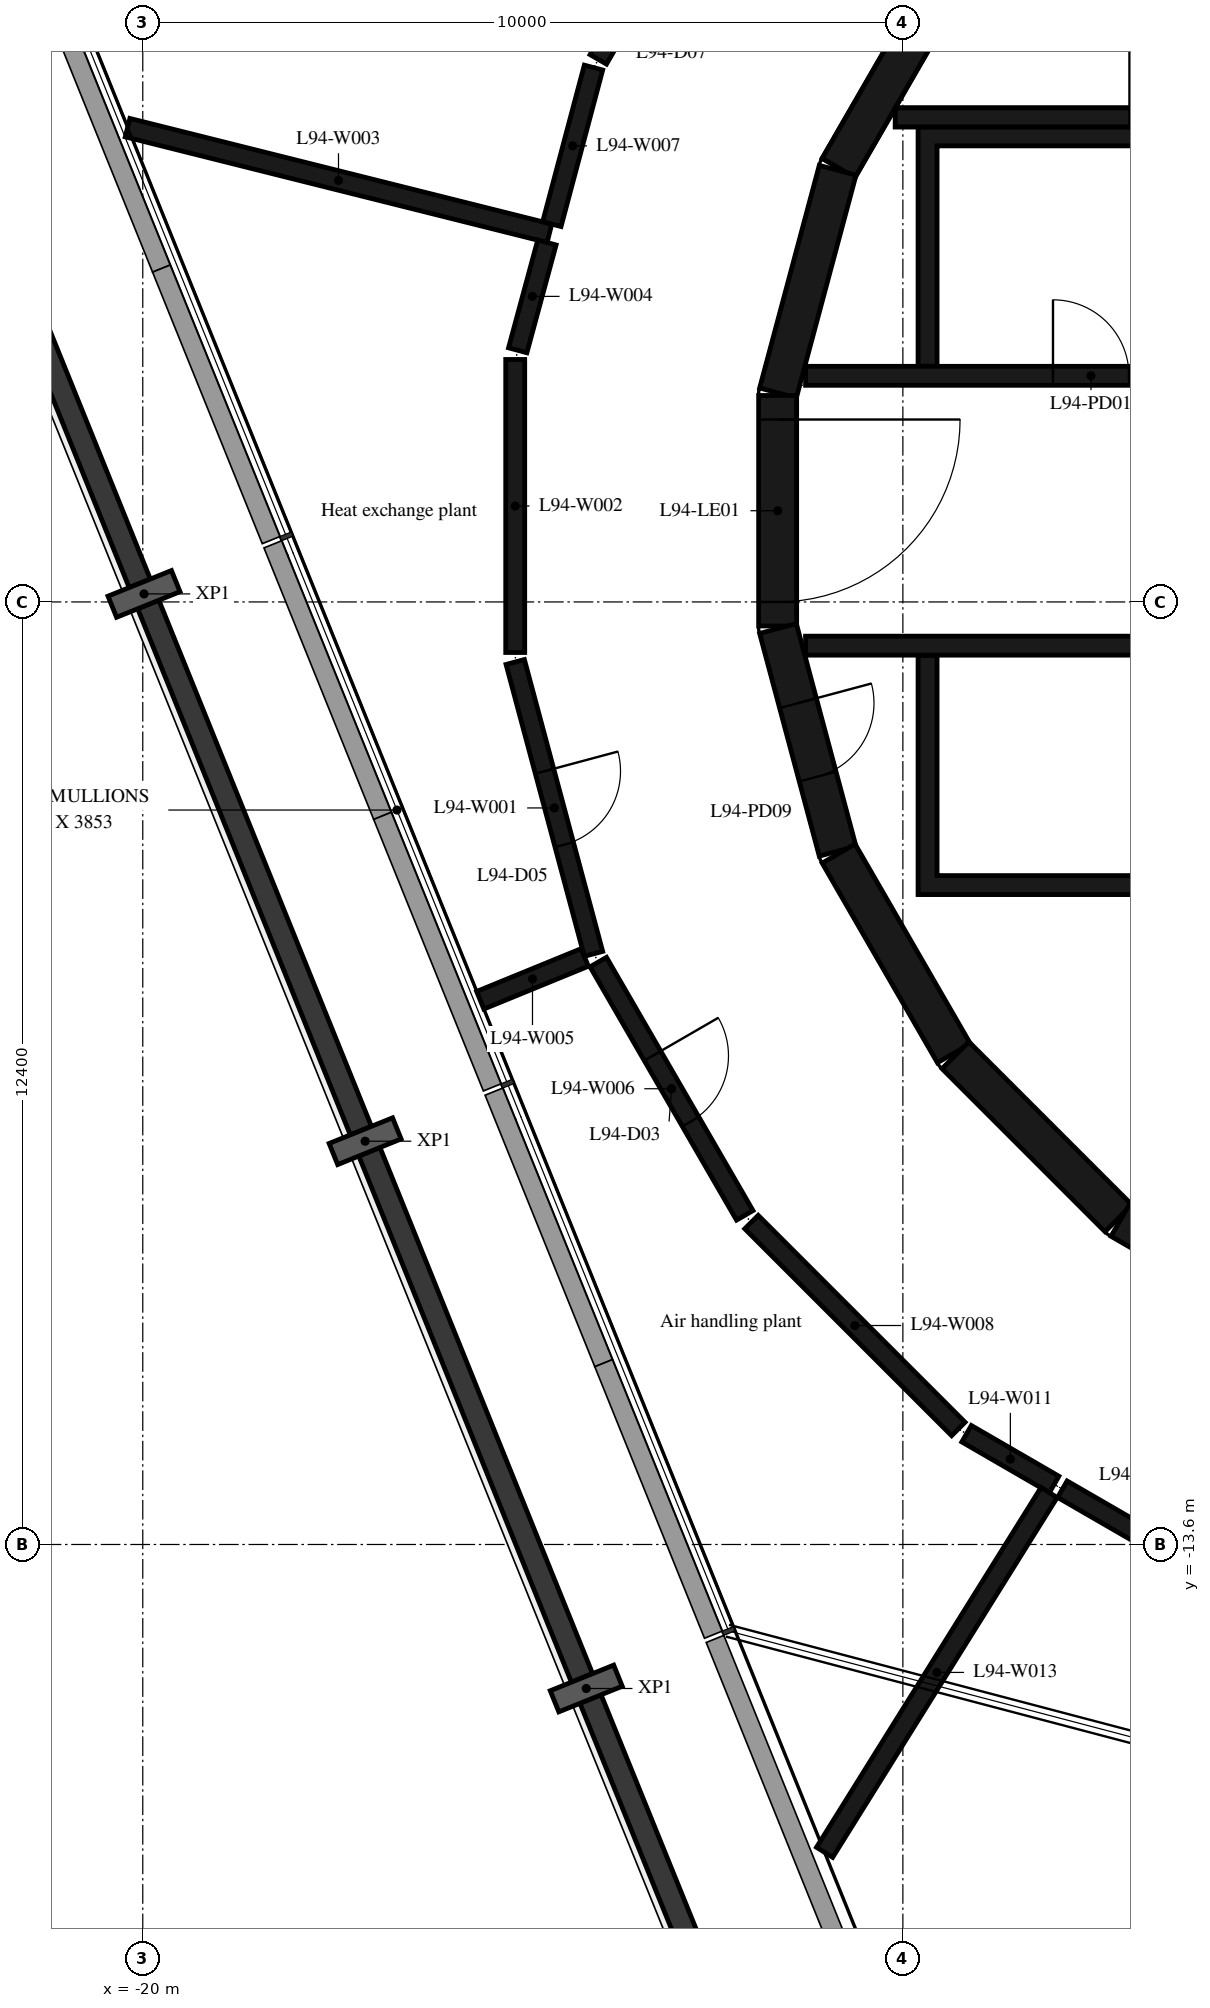
"""IFC4 building model, lengths in metres.
Left out: names, types, materials, properties, quantities, classifications, styles, units other than length and angle.
Written with IfcOpenShell. Run it as: python <this file> out.ifc"""

import sys

from ifc_helpers import new_model, si_unit, direction, frame, frame_2d, origin, origin_2d, place, context, subcontext, project, spatial, polyline, rectangle, i_section, outline, extrude, element, fill, save


model = new_model("IFC4")
c1 = context("Model", 3, precision=1e-05, world=origin(), true_north=direction((0.0, 1.0)))
c2 = subcontext(c1, "Body", "Model", "MODEL_VIEW")
j1 = project(units=[si_unit("LENGTHUNIT", "METRE"), si_unit("PLANEANGLEUNIT", "RADIAN")], contexts=[c1])
p1 = place(None, origin())
s1 = spatial("IfcSite", under=j1, at=p1, CompositionType="ELEMENT")
p2 = place(p1, origin())
s2 = spatial("IfcBuilding", under=s1, at=p2, CompositionType="ELEMENT")
p3 = place(p2, frame((0.0, 0.0, 366.2)))
s3 = spatial("IfcBuildingStorey", under=s2, at=p3, CompositionType="ELEMENT", Elevation=366.2)
for number, where, z_axis, x_axis in (
    (1, (-19.984, -1.094, -0.38), (0.0, 0.0, 1.0), (-0.375, 0.927, 0.0)),
    (2, (-17.075, -8.294, -0.38), (0.0, 0.0, 1.0), (-0.375, 0.927, 0.0)),
    (3, (-14.166, -15.495, -0.38), (0.0, 0.0, 1.0), (-0.375, 0.927, 0.0)),
):
    element("IfcColumn", number, at=place(p3, frame(where, z_axis=z_axis, x_axis=x_axis)), inside=s3, PredefinedType="COLUMN", context=c2, shape_type="SweptSolid", body=[
        extrude(i_section(OverallWidth=0.3, OverallDepth=0.9, WebThickness=0.019, FlangeThickness=0.035, FilletRadius=0.03, at=origin_2d()), origin(), (0.0, 0.0, 1.0), 5.58),
    ])
p4 = place(p3, frame((-22.836, 5.967, 5.2), z_axis=(0.0, 0.0, 1.0), x_axis=(0.374607955373, -0.927183304299, 0.0)))
e4 = element("IfcWall", 4, at=p4, inside=s3, PredefinedType="PARAPET", context=c2, shape_type="SweptSolid", body=[
    extrude(rectangle(XDim=7.466, YDim=0.3, at=frame_2d((3.733, 0.0))), origin(), (0.0, 0.0, 1.0), 0.58),
])
p5 = place(p3, frame((-19.927, -1.233, 5.2), z_axis=(0.0, 0.0, 1.0), x_axis=(0.374596597098, -0.927187893279, 0.0)))
e5 = element("IfcWall", 5, at=p5, inside=s3, PredefinedType="PARAPET", context=c2, shape_type="SweptSolid", body=[
    extrude(rectangle(XDim=7.466, YDim=0.3, at=frame_2d((3.733, 0.0))), origin(), (0.0, 0.0, 1.0), 0.58),
])
p6 = place(p3, frame((-17.018, -8.434, 5.2), z_axis=(0.0, 0.0, 1.0), x_axis=(0.374607955373, -0.927183304299, 0.0)))
e6 = element("IfcWall", 6, at=p6, inside=s3, PredefinedType="PARAPET", context=c2, shape_type="SweptSolid", body=[
    extrude(rectangle(XDim=7.466, YDim=0.3, at=frame_2d((3.733, 0.0))), origin(), (0.0, 0.0, 1.0), 0.58),
])
p7 = place(p3, frame((-14.109, -15.634, 5.2), z_axis=(0.0, 0.0, 1.0), x_axis=(0.375946149404, -0.926641512532, 0.0)))
e7 = element("IfcWall", 7, at=p7, inside=s3, PredefinedType="PARAPET", context=c2, shape_type="SweptSolid", body=[
    extrude(rectangle(XDim=6.536, YDim=0.3, at=frame_2d((3.268, 0.0))), origin(), (0.0, 0.0, 1.0), 0.58),
])
for number, where, z_axis, x_axis in (
    (8, (-9.329, 7.137, 0.0), (0.0, 0.0, 1.0), (-0.5, -0.866, 0.0)),
    (9, (-10.858, 4.479, 0.0), (0.0, 0.0, 1.0), (-0.259, -0.966, 0.0)),
):
    element("IfcWall", number, at=place(p3, frame(where, z_axis=z_axis, x_axis=x_axis)), inside=s3, PredefinedType="SHEAR", context=c2, shape_type="SweptSolid", body=[
        extrude(rectangle(XDim=3.033, YDim=0.5, at=frame_2d((1.516, 0.0))), origin(), (0.0, 0.0, 1.0), 4.8),
    ])
p8 = place(p3, frame((-11.647, 1.516, 0.0), z_axis=(0.0, 0.0, 1.0), x_axis=(0.0, -1.0, 0.0)))
e10 = element("IfcWall", 10, at=p8, inside=s3, PredefinedType="SHEAR", context=c2, shape_type="SweptSolid", body=[
    extrude(rectangle(XDim=3.033, YDim=0.5, at=frame_2d((1.516, 0.0))), origin(), (0.0, 0.0, 1.0), 4.8),
])
p9 = place(p8, frame((0.316, 0.0, 0.0)))
e11 = element("IfcOpeningElement", 11, at=p9, cuts=e10, PredefinedType="OPENING", context=c2, shape_type="SweptSolid", body=[
    extrude(rectangle(XDim=2.4, YDim=2.1, at=frame_2d((1.2, 1.05))), frame((0.0, 0.26, 0.0), z_axis=(0.0, -1.0, 0.0), x_axis=(1.0, 0.0, 0.0)), (0.0, 0.0, 1.0), 0.52),
])
p10 = place(p3, frame((-11.643, -1.55, 0.0), z_axis=(0.0, 0.0, 1.0), x_axis=(0.258734743916, -0.965948410781, 0.0)))
e12 = element("IfcWall", 12, at=p10, inside=s3, PredefinedType="SHEAR", context=c2, shape_type="SweptSolid", body=[
    extrude(rectangle(XDim=3.033, YDim=0.5, at=frame_2d((1.516, 0.0))), origin(), (0.0, 0.0, 1.0), 4.8),
])
p11 = place(p10, frame((1.016, 0.0, 0.0)))
e13 = element("IfcOpeningElement", 13, at=p11, cuts=e12, PredefinedType="OPENING", context=c2, shape_type="SweptSolid", body=[
    extrude(rectangle(XDim=1.0, YDim=2.4, at=frame_2d((0.5, 1.2))), frame((0.0, 0.26, 0.0), z_axis=(0.0, -1.0, 0.0), x_axis=(1.0, 0.0, 0.0)), (0.0, 0.0, 1.0), 0.52),
])
p12 = place(p3, frame((-10.845, -4.51, 0.0), z_axis=(0.0, 0.0, 1.0), x_axis=(0.500087131594, -0.865975092491, 0.0)))
e14 = element("IfcWall", 14, at=p12, inside=s3, PredefinedType="SHEAR", context=c2, shape_type="SweptSolid", body=[
    extrude(rectangle(XDim=3.033, YDim=0.5, at=frame_2d((1.516, 0.0))), origin(), (0.0, 0.0, 1.0), 4.8),
])
p13 = place(p3, frame((-9.308, -7.164, 0.0), z_axis=(0.0, 0.0, 1.0), x_axis=(0.707106781187, -0.707106781187, 0.0)))
e15 = element("IfcWall", 15, at=p13, inside=s3, PredefinedType="SHEAR", context=c2, shape_type="SweptSolid", body=[
    extrude(rectangle(XDim=3.032, YDim=0.5, at=frame_2d((1.516, 0.0))), origin(), (0.0, 0.0, 1.0), 4.8),
])
p14 = place(p3, frame((-7.137, -9.329, 0.0), z_axis=(0.0, 0.0, 1.0), x_axis=(0.865975092491, -0.500087131594, 0.0)))
e16 = element("IfcWall", 16, at=p14, inside=s3, PredefinedType="SHEAR", context=c2, shape_type="SweptSolid", body=[
    extrude(rectangle(XDim=3.033, YDim=0.5, at=frame_2d((1.516, 0.0))), origin(), (0.0, 0.0, 1.0), 4.8),
])
p15 = place(p3, frame((-7.0, 5.175, 0.0), z_axis=(0.0, 0.0, 1.0), x_axis=(-1.0, 0.0, 0.0)))
e17 = element("IfcWall", 17, at=p15, inside=s3, PredefinedType="SHEAR", context=c2, shape_type="SweptSolid", body=[
    extrude(rectangle(XDim=3.1, YDim=0.25, at=frame_2d((1.55, 0.0))), origin(), (0.0, 0.0, 1.0), 4.8),
])
p16 = place(p3, origin())
e18 = element("IfcWall", 18, at=p16, inside=s3, PredefinedType="SHEAR", context=c2, shape_type="SweptSolid", body=[
    extrude(outline(polyline([(-9.8, 1.9), (-9.55, 1.9), (-9.55, 4.8), (-5.5, 4.8), (-5.5, 1.9), (-5.25, 1.9), (-5.25, 4.8), (3.1, 4.8), (3.1, 1.9), (3.35, 1.9), (3.35, 4.8), (5.25, 4.8), (5.25, 1.9), (5.5, 1.9), (5.5, 4.8), (7.4, 4.8), (7.4, 1.9), (7.65, 1.9), (7.65, 4.8), (9.55, 4.8), (9.55, 1.9), (9.8, 1.9), (9.8, 4.8), (9.8, 5.05), (-9.8, 5.05), (-9.8, 4.8), (-9.8, 1.9)])), origin(), (0.0, 0.0, 1.0), 4.8),
])
p17 = place(p3, origin())
e19 = element("IfcWall", 19, at=p17, inside=s3, PredefinedType="SHEAR", context=c2, shape_type="SweptSolid", body=[
    extrude(outline(polyline([(9.8, -4.8), (9.8, -1.9), (9.55, -1.9), (9.55, -4.8), (7.65, -4.8), (7.65, -1.9), (7.4, -1.9), (7.4, -4.8), (5.5, -4.8), (5.5, -1.9), (5.25, -1.9), (5.25, -4.8), (3.35, -4.8), (3.35, -1.9), (3.1, -1.9), (3.1, -4.8), (-9.55, -4.8), (-9.55, -1.9), (-9.8, -1.9), (-9.8, -4.8), (-9.8, -5.05), (9.8, -5.05), (9.8, -4.8)])), origin(), (0.0, 0.0, 1.0), 4.8),
])
p18 = place(p3, frame((-11.28, 1.775, 0.0), z_axis=(0.0, 0.0, 1.0), x_axis=(1.0, 0.0, 0.0)))
e20 = element("IfcWall", 20, at=p18, inside=s3, PredefinedType="SHEAR", context=c2, shape_type="SweptSolid", body=[
    extrude(rectangle(XDim=14.38, YDim=0.25, at=frame_2d((7.19, 0.0))), origin(), (0.0, 0.0, 1.0), 4.8),
])
p19 = place(p18, frame((3.255, 0.0, 0.0)))
e21 = element("IfcOpeningElement", 21, at=p19, cuts=e20, PredefinedType="OPENING", context=c2, shape_type="SweptSolid", body=[
    extrude(rectangle(XDim=1.0, YDim=2.4, at=frame_2d((0.5, 1.2))), frame((0.0, 0.135, 0.0), z_axis=(0.0, -1.0, 0.0), x_axis=(1.0, 0.0, 0.0)), (0.0, 0.0, 1.0), 0.27),
])
p20 = place(p18, frame((9.705, 0.0, 0.0)))
e22 = element("IfcOpeningElement", 22, at=p20, cuts=e20, PredefinedType="OPENING", context=c2, shape_type="SweptSolid", body=[
    extrude(rectangle(XDim=1.0, YDim=2.4, at=frame_2d((0.5, 1.2))), frame((0.0, 0.135, 0.0), z_axis=(0.0, -1.0, 0.0), x_axis=(1.0, 0.0, 0.0)), (0.0, 0.0, 1.0), 0.27),
])
p21 = place(p3, frame((-11.28, -1.775, 0.0), z_axis=(0.0, 0.0, 1.0), x_axis=(1.0, 0.0, 0.0)))
e23 = element("IfcWall", 23, at=p21, inside=s3, PredefinedType="SHEAR", context=c2, shape_type="SweptSolid", body=[
    extrude(rectangle(XDim=14.38, YDim=0.25, at=frame_2d((7.19, 0.0))), origin(), (0.0, 0.0, 1.0), 4.8),
])
p22 = place(p21, frame((7.555, 0.0, 0.0)))
e24 = element("IfcOpeningElement", 24, at=p22, cuts=e23, PredefinedType="OPENING", context=c2, shape_type="SweptSolid", body=[
    extrude(rectangle(XDim=1.0, YDim=2.4, at=frame_2d((0.5, 1.2))), frame((0.0, 0.135, 0.0), z_axis=(0.0, -1.0, 0.0), x_axis=(1.0, 0.0, 0.0)), (0.0, 0.0, 1.0), 0.27),
])
p23 = place(p3, frame((-7.0, 5.175, 5.2), z_axis=(0.0, 0.0, 1.0), x_axis=(-1.0, 0.0, 0.0)))
e25 = element("IfcWall", 25, at=p23, inside=s3, PredefinedType="SHEAR", context=c2, shape_type="SweptSolid", body=[
    extrude(rectangle(XDim=3.1, YDim=0.25, at=frame_2d((1.55, 0.0))), origin(), (0.0, 0.0, 1.0), 2.8),
])
p24 = place(p3, frame((-9.329, 7.137, 5.2), z_axis=(0.0, 0.0, 1.0), x_axis=(-0.500087131594, -0.865975092491, 0.0)))
e26 = element("IfcWall", 26, at=p24, inside=s3, PredefinedType="SHEAR", context=c2, shape_type="SweptSolid", body=[
    extrude(rectangle(XDim=3.033, YDim=0.5, at=frame_2d((1.516, 0.0))), origin(), (0.0, 0.0, 1.0), 2.8),
])
p25 = place(p3, frame((-15.1, -1.99, 0.0), z_axis=(0.0, 0.0, 1.0), x_axis=(0.259072679895, -0.965857829358, 0.0)))
e27 = element("IfcWall", 27, at=p25, inside=s3, PredefinedType="PARTITIONING", context=c2, shape_type="SweptSolid", body=[
    extrude(rectangle(XDim=3.976, YDim=0.25, at=frame_2d((1.988, 0.0))), origin(), (0.0, 0.0, 1.0), 4.8),
])
p26 = place(p25, frame((1.488, 0.0, 0.0)))
e28 = element("IfcOpeningElement", 28, at=p26, cuts=e27, PredefinedType="OPENING", context=c2, shape_type="SweptSolid", body=[
    extrude(rectangle(XDim=1.0, YDim=2.1, at=frame_2d((0.5, 1.05))), frame((0.0, 0.135, 0.0), z_axis=(0.0, -1.0, 0.0), x_axis=(1.0, 0.0, 0.0)), (0.0, 0.0, 1.0), 0.27),
])
p27 = place(p3, frame((-15.1, 1.99, 0.0), z_axis=(0.0, 0.0, 1.0), x_axis=(0.0, -1.0, 0.0)))
e29 = element("IfcWall", 29, at=p27, inside=s3, PredefinedType="PARTITIONING", context=c2, shape_type="SweptSolid", body=[
    extrude(rectangle(XDim=3.855, YDim=0.25, at=frame_2d((1.927, 0.0))), origin(), (0.0, 0.0, 1.0), 4.8),
])
p28 = place(p3, frame((-14.65, 3.65, 0.0), z_axis=(0.0, 0.0, 1.0), x_axis=(-0.970034472151, 0.242967328748, 0.0)))
e30 = element("IfcWall", 30, at=p28, inside=s3, PredefinedType="PARTITIONING", context=c2, shape_type="SweptSolid", body=[
    extrude(rectangle(XDim=5.721, YDim=0.25, at=frame_2d((2.861, 0.0))), origin(), (0.0, 0.0, 1.0), 4.8),
])
p29 = place(p3, frame((-14.683, 3.529, 0.0), z_axis=(0.0, 0.0, 1.0), x_axis=(-0.261753947787, -0.9651346387, 0.0)))
e31 = element("IfcWall", 31, at=p29, inside=s3, PredefinedType="PARTITIONING", context=c2, shape_type="SweptSolid", body=[
    extrude(rectangle(XDim=1.47, YDim=0.25, at=frame_2d((0.735, 0.0))), origin(), (0.0, 0.0, 1.0), 4.8),
])
p30 = place(p3, frame((-14.186, -5.877, 0.0), z_axis=(0.0, 0.0, 1.0), x_axis=(-0.925476228273, -0.378805690165, 0.0)))
e32 = element("IfcWall", 32, at=p30, inside=s3, PredefinedType="PARTITIONING", context=c2, shape_type="SweptSolid", body=[
    extrude(rectangle(XDim=1.485, YDim=0.25, at=frame_2d((0.742, 0.0))), origin(), (0.0, 0.0, 1.0), 4.8),
])
p31 = place(p3, frame((-14.007, -5.938, 0.0), z_axis=(0.0, 0.0, 1.0), x_axis=(0.500708693508, -0.865615852585, 0.0)))
e33 = element("IfcWall", 33, at=p31, inside=s3, PredefinedType="PARTITIONING", context=c2, shape_type="SweptSolid", body=[
    extrude(rectangle(XDim=3.849, YDim=0.25, at=frame_2d((1.925, 0.0))), origin(), (0.0, 0.0, 1.0), 4.8),
])
p32 = place(p31, frame((1.425, 0.0, 0.0)))
e34 = element("IfcOpeningElement", 34, at=p32, cuts=e33, PredefinedType="OPENING", context=c2, shape_type="SweptSolid", body=[
    extrude(rectangle(XDim=1.0, YDim=2.1, at=frame_2d((0.5, 1.05))), frame((0.0, 0.135, 0.0), z_axis=(0.0, -1.0, 0.0), x_axis=(1.0, 0.0, 0.0)), (0.0, 0.0, 1.0), 0.27),
])
p33 = place(p3, frame((-14.07, 5.83, 0.0), z_axis=(0.0, 0.0, 1.0), x_axis=(-0.25709213915, -0.9663868956, 0.0)))
e35 = element("IfcWall", 35, at=p33, inside=s3, PredefinedType="PARTITIONING", context=c2, shape_type="SweptSolid", body=[
    extrude(rectangle(XDim=2.131, YDim=0.25, at=frame_2d((1.065, 0.0))), origin(), (0.0, 0.0, 1.0), 4.8),
])
p34 = place(p3, frame((-11.992, -9.358, 0.0), z_axis=(0.0, 0.0, 1.0), x_axis=(0.707106781187, -0.707106781187, 0.0)))
e36 = element("IfcWall", 36, at=p34, inside=s3, PredefinedType="PARTITIONING", context=c2, shape_type="SweptSolid", body=[
    extrude(rectangle(XDim=3.849, YDim=0.25, at=frame_2d((1.925, 0.0))), origin(), (0.0, 0.0, 1.0), 4.8),
])
p35 = place(p3, frame((-12.08, 9.27, 0.0), z_axis=(0.0, 0.0, 1.0), x_axis=(-0.500708693508, -0.865615852585, 0.0)))
e37 = element("IfcWall", 37, at=p35, inside=s3, PredefinedType="PARTITIONING", context=c2, shape_type="SweptSolid", body=[
    extrude(rectangle(XDim=3.849, YDim=0.25, at=frame_2d((1.925, 0.0))), origin(), (0.0, 0.0, 1.0), 4.8),
])
p36 = place(p35, frame((1.425, 0.0, 0.0)))
e38 = element("IfcOpeningElement", 38, at=p36, cuts=e37, PredefinedType="OPENING", context=c2, shape_type="SweptSolid", body=[
    extrude(rectangle(XDim=1.0, YDim=2.1, at=frame_2d((0.5, 1.05))), frame((0.0, 0.135, 0.0), z_axis=(0.0, -1.0, 0.0), x_axis=(1.0, 0.0, 0.0)), (0.0, 0.0, 1.0), 0.27),
])
p37 = place(p3, frame((-9.162, -12.143, 0.0), z_axis=(0.0, 0.0, 1.0), x_axis=(0.865225325987, -0.501383221968, 0.0)))
e39 = element("IfcWall", 39, at=p37, inside=s3, PredefinedType="PARTITIONING", context=c2, shape_type="SweptSolid", body=[
    extrude(rectangle(XDim=1.331, YDim=0.25, at=frame_2d((0.666, 0.0))), origin(), (0.0, 0.0, 1.0), 4.8),
])
p38 = place(p3, frame((-8.076, -12.916, 0.0), z_axis=(0.0, 0.0, 1.0), x_axis=(-0.529377395223, -0.848386452878, 0.0)))
e40 = element("IfcWall", 40, at=p38, inside=s3, PredefinedType="PARTITIONING", context=c2, shape_type="SweptSolid", body=[
    extrude(rectangle(XDim=5.58, YDim=0.25, at=frame_2d((2.79, 0.0))), origin(), (0.0, 0.0, 1.0), 4.8),
])
p39 = place(p3, frame((-7.902, -12.873, 0.0), z_axis=(0.0, 0.0, 1.0), x_axis=(0.865777653854, -0.500428870157, 0.0)))
e41 = element("IfcWall", 41, at=p39, inside=s3, PredefinedType="PARTITIONING", context=c2, shape_type="SweptSolid", body=[
    extrude(rectangle(XDim=2.393, YDim=0.25, at=frame_2d((1.197, 0.0))), origin(), (0.0, 0.0, 1.0), 4.8),
])
p40 = place(p9, origin())
e42 = element("IfcDoor", 42, at=p40, inside=s3, OperationType="DOUBLE_DOOR_SINGLE_SWING", PredefinedType="DOOR", context=c2, shape_type="SweptSolid", body=[
    extrude(rectangle(XDim=2.4, YDim=2.1, at=frame_2d((1.2, 1.05))), frame((0.0, 0.025, 0.0), z_axis=(0.0, -1.0, 0.0), x_axis=(1.0, 0.0, 0.0)), (0.0, 0.0, 1.0), 0.05),
])
fill(e11, e42)
p41 = place(p19, origin())
e43 = element("IfcDoor", 43, at=p41, inside=s3, OperationType="SINGLE_SWING_RIGHT", PredefinedType="DOOR", context=c2, shape_type="SweptSolid", body=[
    extrude(rectangle(XDim=1.0, YDim=2.4, at=frame_2d((0.5, 1.2))), frame((0.0, 0.025, 0.0), z_axis=(0.0, -1.0, 0.0), x_axis=(1.0, 0.0, 0.0)), (0.0, 0.0, 1.0), 0.05),
])
fill(e21, e43)
p42 = place(p11, origin())
e44 = element("IfcDoor", 44, at=p42, inside=s3, OperationType="SINGLE_SWING_RIGHT", PredefinedType="DOOR", context=c2, shape_type="SweptSolid", body=[
    extrude(rectangle(XDim=1.0, YDim=2.4, at=frame_2d((0.5, 1.2))), frame((0.0, 0.025, 0.0), z_axis=(0.0, -1.0, 0.0), x_axis=(1.0, 0.0, 0.0)), (0.0, 0.0, 1.0), 0.05),
])
fill(e13, e44)
p43 = place(p32, origin())
e45 = element("IfcDoor", 45, at=p43, inside=s3, OperationType="SINGLE_SWING_LEFT", PredefinedType="DOOR", context=c2, shape_type="SweptSolid", body=[
    extrude(rectangle(XDim=1.0, YDim=2.1, at=frame_2d((0.5, 1.05))), frame((0.0, 0.025, 0.0), z_axis=(0.0, -1.0, 0.0), x_axis=(1.0, 0.0, 0.0)), (0.0, 0.0, 1.0), 0.05),
])
fill(e34, e45)
p44 = place(p26, origin())
e46 = element("IfcDoor", 46, at=p44, inside=s3, OperationType="SINGLE_SWING_LEFT", PredefinedType="DOOR", context=c2, shape_type="SweptSolid", body=[
    extrude(rectangle(XDim=1.0, YDim=2.1, at=frame_2d((0.5, 1.05))), frame((0.0, 0.025, 0.0), z_axis=(0.0, -1.0, 0.0), x_axis=(1.0, 0.0, 0.0)), (0.0, 0.0, 1.0), 0.05),
])
fill(e28, e46)
save(model, sys.argv[1])
